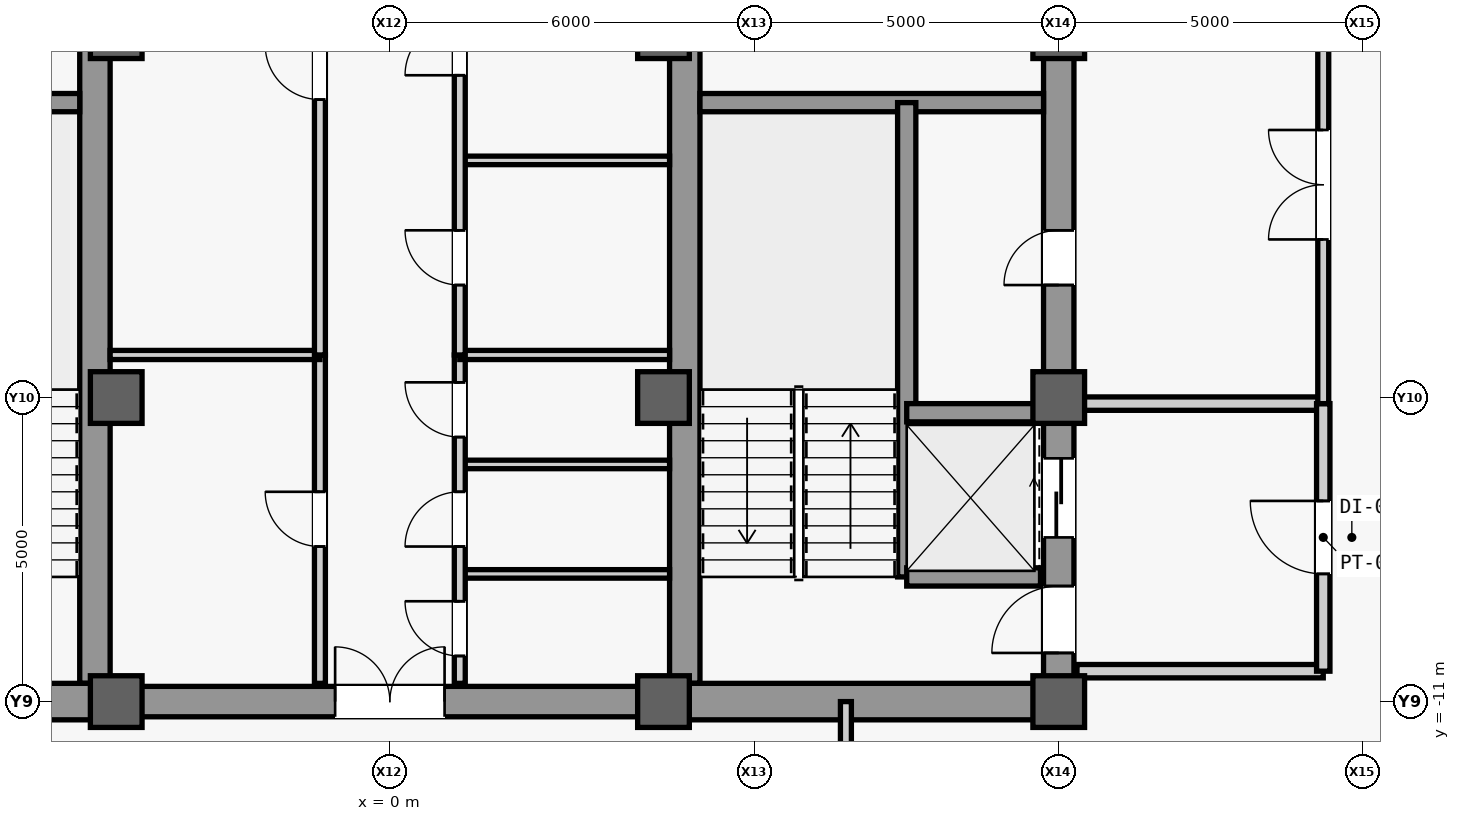
"""IFC4 building model, lengths in metres.
Left out: names, types, materials, properties, quantities, classifications, styles, units other than length and angle.
Written with IfcOpenShell. Run it as: python <this file> out.ifc"""

import sys

from ifc_helpers import new_model, si_unit, direction, frame, frame_2d, origin, origin_2d, place, context, subcontext, project, spatial, rectangle, extrude, source, transform, mapped, element, fill, save


model = new_model("IFC4")
c1 = context("Model", 3, precision=1e-05, world=origin(), true_north=direction((0.0, 1.0)))
c2 = subcontext(c1, "Body", "Model", "MODEL_VIEW")
j1 = project(units=[si_unit("LENGTHUNIT", "METRE"), si_unit("PLANEANGLEUNIT", "RADIAN")], contexts=[c1])
p1 = place(None, origin())
s1 = spatial("IfcSite", under=j1, at=p1, CompositionType="ELEMENT")
p2 = place(p1, origin())
s2 = spatial("IfcBuilding", under=s1, at=p2, CompositionType="ELEMENT")
p3 = place(p2, frame((0.0, 0.0, 223.1)))
s3 = spatial("IfcBuildingStorey", under=s2, at=p3, CompositionType="ELEMENT", Elevation=223.1)
m1 = source(origin(), c2, "Body", "SweptSolid", [
    extrude(rectangle(XDim=22.0, YDim=0.5, at=frame_2d((11.0, 0.0))), origin(), (0.0, 0.0, 1.0), 3.78),
])
p4 = place(p3, frame((11.0, -11.0, 0.0), z_axis=(0.0, 0.0, 1.0), x_axis=(0.0, 1.0, 0.0)))
e1 = element("IfcWall", 1, at=p4, inside=s3, PredefinedType="SHEAR", context=c2, shape_type="MappedRepresentation", body=[
    mapped(m1, transform((0.0, 0.0, 0.0), scale=1.0)),
])
m2 = source(origin(), c2, "Body", "SweptSolid", [
    extrude(rectangle(XDim=1.1, YDim=2.2, at=frame_2d((0.55, 1.1))), frame((0.0, 0.26, 0.0), z_axis=(0.0, -1.0, 0.0), x_axis=(1.0, 0.0, 0.0)), (0.0, 0.0, 1.0), 0.52),
])
p5 = place(p4, frame((0.8, 0.0, 0.0)))
e2 = element("IfcOpeningElement", 2, at=p5, cuts=e1, PredefinedType="OPENING", context=c2, shape_type="MappedRepresentation", body=[
    mapped(m2, transform((0.0, 0.0, 0.0), scale=1.0)),
])
m3 = source(origin(), c2, "Body", "SweptSolid", [
    extrude(rectangle(XDim=0.9, YDim=2.15, at=frame_2d((0.45, 1.075))), frame((0.0, 0.26, 0.0), z_axis=(0.0, -1.0, 0.0), x_axis=(1.0, 0.0, 0.0)), (0.0, 0.0, 1.0), 0.52),
])
p6 = place(p4, frame((6.85, 0.0, 0.0)))
e3 = element("IfcOpeningElement", 3, at=p6, cuts=e1, PredefinedType="OPENING", context=c2, shape_type="MappedRepresentation", body=[
    mapped(m3, transform((0.0, 0.0, 0.0), scale=1.0)),
])
m4 = source(origin(), c2, "Body", "SweptSolid", [
    extrude(rectangle(XDim=1.3, YDim=2.3, at=frame_2d((0.65, 1.15))), frame((0.0, 0.26, 0.0), z_axis=(0.0, -1.0, 0.0), x_axis=(1.0, 0.0, 0.0)), (0.0, 0.0, 1.0), 0.52),
])
p7 = place(p4, frame((2.7, 0.0, 0.0)))
e4 = element("IfcOpeningElement", 4, at=p7, cuts=e1, PredefinedType="OPENING", context=c2, shape_type="MappedRepresentation", body=[
    mapped(m4, transform((0.0, 0.0, 0.0), scale=1.0)),
])
p8 = place(p4, frame((13.35, 0.0, 0.0)))
e5 = element("IfcOpeningElement", 5, at=p8, cuts=e1, PredefinedType="OPENING", context=c2, shape_type="MappedRepresentation", body=[
    mapped(m4, transform((0.0, 0.0, 0.0), scale=1.0)),
])
m5 = source(origin(), c2, "Body", "SweptSolid", [
    extrude(rectangle(XDim=21.4, YDim=0.5, at=frame_2d((10.7, 0.0))), origin(), (0.0, 0.0, 1.0), 3.78),
])
for number, where, z_axis, x_axis in (
    (6, (-4.85, -10.7, 0.0), (0.0, 0.0, 1.0), (0.0, 1.0, 0.0)),
    (7, (4.85, -10.7, 0.0), (0.0, 0.0, 1.0), (0.0, 1.0, 0.0)),
):
    element("IfcWall", number, at=place(p3, frame(where, z_axis=z_axis, x_axis=x_axis)), inside=s3, PredefinedType="SHEAR", context=c2, shape_type="MappedRepresentation", body=[
        mapped(m5, transform((0.0, 0.0, 0.0), scale=1.0)),
    ])
m6 = source(origin(), c2, "Body", "SweptSolid", [
    extrude(rectangle(XDim=5.9, YDim=0.6, at=frame_2d((2.95, 0.0))), origin(), (0.0, 0.0, 1.0), 3.78),
])
for number, where, z_axis, x_axis in (
    (8, (-10.75, -11.0, 0.0), (0.0, 0.0, 1.0), (1.0, 0.0, 0.0)),
    (9, (4.85, -11.0, 0.0), (0.0, 0.0, 1.0), (1.0, 0.0, 0.0)),
):
    element("IfcWall", number, at=place(p3, frame(where, z_axis=z_axis, x_axis=x_axis)), inside=s3, PredefinedType="SHEAR", context=c2, shape_type="MappedRepresentation", body=[
        mapped(m6, transform((0.0, 0.0, 0.0), scale=1.0)),
    ])
m7 = source(origin(), c2, "Body", "SweptSolid", [
    extrude(rectangle(XDim=5.65, YDim=0.3, at=frame_2d((2.825, 0.0))), origin(), (0.0, 0.0, 1.0), 3.78),
])
for number, where, z_axis, x_axis in (
    (10, (-10.75, -1.15, 0.0), (0.0, 0.0, 1.0), (1.0, 0.0, 0.0)),
    (11, (5.1, -1.15, 0.0), (0.0, 0.0, 1.0), (1.0, 0.0, 0.0)),
):
    element("IfcWall", number, at=place(p3, frame(where, z_axis=z_axis, x_axis=x_axis)), inside=s3, PredefinedType="SHEAR", context=c2, shape_type="MappedRepresentation", body=[
        mapped(m7, transform((0.0, 0.0, 0.0), scale=1.0)),
    ])
m8 = source(origin(), c2, "Body", "SweptSolid", [
    extrude(rectangle(XDim=9.2, YDim=0.5, at=frame_2d((4.6, 0.0))), origin(), (0.0, 0.0, 1.0), 3.78),
])
p9 = place(p3, frame((-4.6, -11.0, 0.0), z_axis=(0.0, 0.0, 1.0), x_axis=(1.0, 0.0, 0.0)))
e12 = element("IfcWall", 12, at=p9, inside=s3, PredefinedType="SHEAR", context=c2, shape_type="MappedRepresentation", body=[
    mapped(m8, transform((0.0, 0.0, 0.0), scale=1.0)),
])
m9 = source(origin(), c2, "Body", "SweptSolid", [
    extrude(rectangle(XDim=1.8, YDim=2.25, at=frame_2d((0.9, 1.125))), frame((0.0, 0.26, 0.0), z_axis=(0.0, -1.0, 0.0), x_axis=(1.0, 0.0, 0.0)), (0.0, 0.0, 1.0), 0.52),
])
p10 = place(p9, frame((3.7, 0.0, 0.0)))
e13 = element("IfcOpeningElement", 13, at=p10, cuts=e12, PredefinedType="OPENING", context=c2, shape_type="MappedRepresentation", body=[
    mapped(m9, transform((0.0, 0.0, 0.0), scale=1.0)),
])
m10 = source(origin(), c2, "Body", "SweptSolid", [
    extrude(rectangle(XDim=0.85, YDim=0.85, at=origin_2d()), origin(), (0.0, 0.0, 1.0), 4.0),
])
for number, where, z_axis, x_axis in (
    (14, (-4.5, -11.0, 0.0), (0.0, 0.0, 1.0), (1.0, 0.0, 0.0)),
    (15, (-4.5, -6.0, 0.0), (0.0, 0.0, 1.0), (1.0, 0.0, 0.0)),
    (16, (-4.5, 0.0, 0.0), (0.0, 0.0, 1.0), (1.0, 0.0, 0.0)),
    (17, (4.5, -11.0, 0.0), (0.0, 0.0, 1.0), (1.0, 0.0, 0.0)),
    (18, (4.5, -6.0, 0.0), (0.0, 0.0, 1.0), (1.0, 0.0, 0.0)),
    (19, (4.5, 0.0, 0.0), (0.0, 0.0, 1.0), (1.0, 0.0, 0.0)),
    (20, (11.0, -11.0, 0.0), (0.0, 0.0, 1.0), (1.0, 0.0, 0.0)),
    (21, (11.0, -6.0, 0.0), (0.0, 0.0, 1.0), (1.0, 0.0, 0.0)),
    (22, (11.0, 0.0, 0.0), (0.0, 0.0, 1.0), (1.0, 0.0, 0.0)),
):
    element("IfcColumn", number, at=place(p3, frame(where, z_axis=z_axis, x_axis=x_axis)), inside=s3, PredefinedType="COLUMN", context=c2, shape_type="MappedRepresentation", body=[
        mapped(m10, transform((0.0, 0.0, 0.0), scale=1.0)),
    ])
m11 = source(origin(), c2, "Body", "SweptSolid", [
    extrude(rectangle(XDim=7.8, YDim=0.3, at=frame_2d((3.9, 0.0))), origin(), (0.0, 0.0, 1.0), 3.78),
])
p11 = place(p3, frame((8.5, -8.95, 0.0), z_axis=(0.0, 0.0, 1.0), x_axis=(0.0, 1.0, 0.0)))
e23 = element("IfcWall", 23, at=p11, inside=s3, PredefinedType="SHEAR", context=c2, shape_type="MappedRepresentation", body=[
    mapped(m11, transform((0.0, 0.0, 0.0), scale=1.0)),
])
m12 = source(origin(), c2, "Body", "SweptSolid", [
    extrude(rectangle(XDim=2.2, YDim=0.3, at=frame_2d((1.1, 0.0))), origin(), (0.0, 0.0, 1.0), 3.78),
])
for number, where, z_axis, x_axis in (
    (24, (8.5, -8.95, 0.0), (0.0, 0.0, 1.0), (1.0, 0.0, 0.0)),
    (25, (8.5, -6.25, 0.0), (0.0, 0.0, 1.0), (1.0, 0.0, 0.0)),
):
    element("IfcWall", number, at=place(p3, frame(where, z_axis=z_axis, x_axis=x_axis)), inside=s3, PredefinedType="SHEAR", context=c2, shape_type="MappedRepresentation", body=[
        mapped(m12, transform((0.0, 0.0, 0.0), scale=1.0)),
    ])
m13 = source(origin(), c2, "Body", "SweptSolid", [
    extrude(rectangle(XDim=4.05, YDim=0.22, at=frame_2d((2.025, 0.0))), origin(), (0.0, 0.0, 1.0), 3.78),
])
p12 = place(p3, frame((11.3, -10.5, 0.0), z_axis=(0.0, 0.0, 1.0), x_axis=(1.0, 0.0, 0.0)))
e26 = element("IfcWall", 26, at=p12, inside=s3, PredefinedType="PARTITIONING", context=c2, shape_type="MappedRepresentation", body=[
    mapped(m13, transform((0.0, 0.0, 0.0), scale=1.0)),
])
m14 = source(origin(), c2, "Body", "SweptSolid", [
    extrude(rectangle(XDim=4.05, YDim=0.22, at=frame_2d((2.025, 0.0))), origin(), (0.0, 0.0, 1.0), 3.085),
])
p13 = place(p3, frame((11.3, -6.1, 0.0), z_axis=(0.0, 0.0, 1.0), x_axis=(1.0, 0.0, 0.0)))
e27 = element("IfcWall", 27, at=p13, inside=s3, PredefinedType="PARTITIONING", context=c2, shape_type="MappedRepresentation", body=[
    mapped(m14, transform((0.0, 0.0, 0.0), scale=1.0)),
])
m15 = source(origin(), c2, "Body", "SweptSolid", [
    extrude(rectangle(XDim=4.4, YDim=0.22, at=frame_2d((2.2, 0.0))), origin(), (0.0, 0.0, 1.0), 3.78),
])
p14 = place(p3, frame((15.35, -10.5, 0.0), z_axis=(0.0, 0.0, 1.0), x_axis=(0.0, 1.0, 0.0)))
e28 = element("IfcWall", 28, at=p14, inside=s3, PredefinedType="PARTITIONING", context=c2, shape_type="MappedRepresentation", body=[
    mapped(m15, transform((0.0, 0.0, 0.0), scale=1.0)),
])
m16 = source(origin(), c2, "Body", "SweptSolid", [
    extrude(rectangle(XDim=1.2, YDim=2.2, at=frame_2d((0.6, 1.1))), frame((0.0, 0.12, 0.0), z_axis=(0.0, -1.0, 0.0), x_axis=(1.0, 0.0, 0.0)), (0.0, 0.0, 1.0), 0.24),
])
p15 = place(p14, frame((1.6, 0.0, 0.0)))
e29 = element("IfcOpeningElement", 29, at=p15, cuts=e28, PredefinedType="OPENING", context=c2, shape_type="MappedRepresentation", body=[
    mapped(m16, transform((0.0, 0.0, 0.0), scale=1.0)),
])
m17 = source(origin(), c2, "Body", "SweptSolid", [
    extrude(rectangle(XDim=16.6, YDim=0.18, at=frame_2d((8.3, 0.0))), origin(), (0.0, 0.0, 1.0), 3.78),
])
p16 = place(p3, frame((15.35, -6.1, 0.0), z_axis=(0.0, 0.0, 1.0), x_axis=(0.0, 1.0, 0.0)))
e30 = element("IfcWall", 30, at=p16, inside=s3, PredefinedType="PARTITIONING", context=c2, shape_type="MappedRepresentation", body=[
    mapped(m17, transform((0.0, 0.0, 0.0), scale=1.0)),
])
m18 = source(origin(), c2, "Body", "SweptSolid", [
    extrude(rectangle(XDim=1.8, YDim=2.25, at=frame_2d((0.9, 1.125))), frame((0.0, 0.1, 0.0), z_axis=(0.0, -1.0, 0.0), x_axis=(1.0, 0.0, 0.0)), (0.0, 0.0, 1.0), 0.2),
])
p17 = place(p16, frame((2.7, 0.0, 0.0)))
e31 = element("IfcOpeningElement", 31, at=p17, cuts=e30, PredefinedType="OPENING", context=c2, shape_type="MappedRepresentation", body=[
    mapped(m18, transform((0.0, 0.0, 0.0), scale=1.0)),
])
p18 = place(p16, frame((13.0, 0.0, 0.0)))
e32 = element("IfcOpeningElement", 32, at=p18, cuts=e30, PredefinedType="OPENING", context=c2, shape_type="MappedRepresentation", body=[
    mapped(m18, transform((0.0, 0.0, 0.0), scale=1.0)),
])
m19 = source(origin(), c2, "Body", "SweptSolid", [
    extrude(rectangle(XDim=5.4, YDim=0.18, at=frame_2d((2.7, 0.0))), origin(), (0.0, 0.0, 1.0), 3.78),
])
p19 = place(p3, frame((-1.15, -10.7, 0.0), z_axis=(0.0, 0.0, 1.0), x_axis=(0.0, 1.0, 0.0)))
e33 = element("IfcWall", 33, at=p19, inside=s3, PredefinedType="PARTITIONING", context=c2, shape_type="MappedRepresentation", body=[
    mapped(m19, transform((0.0, 0.0, 0.0), scale=1.0)),
])
m20 = source(origin(), c2, "Body", "SweptSolid", [
    extrude(rectangle(XDim=0.9, YDim=2.15, at=frame_2d((0.45, 1.075))), frame((0.0, 0.1, 0.0), z_axis=(0.0, -1.0, 0.0), x_axis=(1.0, 0.0, 0.0)), (0.0, 0.0, 1.0), 0.2),
])
p20 = place(p19, frame((2.25, 0.0, 0.0)))
e34 = element("IfcOpeningElement", 34, at=p20, cuts=e33, PredefinedType="OPENING", context=c2, shape_type="MappedRepresentation", body=[
    mapped(m20, transform((0.0, 0.0, 0.0), scale=1.0)),
])
m21 = source(origin(), c2, "Body", "SweptSolid", [
    extrude(rectangle(XDim=3.45, YDim=0.14, at=frame_2d((1.725, 0.0))), origin(), (0.0, 0.0, 1.0), 3.78),
])
for number, where, z_axis, x_axis in (
    (35, (1.15, -8.9, 0.0), (0.0, 0.0, 1.0), (1.0, 0.0, 0.0)),
    (36, (1.15, -7.1, 0.0), (0.0, 0.0, 1.0), (1.0, 0.0, 0.0)),
):
    element("IfcWall", number, at=place(p3, frame(where, z_axis=z_axis, x_axis=x_axis)), inside=s3, PredefinedType="PARTITIONING", context=c2, shape_type="MappedRepresentation", body=[
        mapped(m21, transform((0.0, 0.0, 0.0), scale=1.0)),
    ])
p21 = place(p3, frame((1.15, -10.7, 0.0), z_axis=(0.0, 0.0, 1.0), x_axis=(0.0, 1.0, 0.0)))
e37 = element("IfcWall", 37, at=p21, inside=s3, PredefinedType="PARTITIONING", context=c2, shape_type="MappedRepresentation", body=[
    mapped(m19, transform((0.0, 0.0, 0.0), scale=1.0)),
])
p22 = place(p21, frame((0.45, 0.0, 0.0)))
e38 = element("IfcOpeningElement", 38, at=p22, cuts=e37, PredefinedType="OPENING", context=c2, shape_type="MappedRepresentation", body=[
    mapped(m20, transform((0.0, 0.0, 0.0), scale=1.0)),
])
p23 = place(p21, frame((2.25, 0.0, 0.0)))
e39 = element("IfcOpeningElement", 39, at=p23, cuts=e37, PredefinedType="OPENING", context=c2, shape_type="MappedRepresentation", body=[
    mapped(m20, transform((0.0, 0.0, 0.0), scale=1.0)),
])
p24 = place(p21, frame((4.05, 0.0, 0.0)))
e40 = element("IfcOpeningElement", 40, at=p24, cuts=e37, PredefinedType="OPENING", context=c2, shape_type="MappedRepresentation", body=[
    mapped(m20, transform((0.0, 0.0, 0.0), scale=1.0)),
])
m22 = source(origin(), c2, "Body", "SweptSolid", [
    extrude(rectangle(XDim=3.45, YDim=0.15, at=frame_2d((1.725, 0.0))), origin(), (0.0, 0.0, 1.0), 3.78),
])
for number, where, z_axis, x_axis in (
    (41, (-4.6, -5.3, 0.0), (0.0, 0.0, 1.0), (1.0, 0.0, 0.0)),
    (42, (1.15, -5.3, 0.0), (0.0, 0.0, 1.0), (1.0, 0.0, 0.0)),
):
    element("IfcWall", number, at=place(p3, frame(where, z_axis=z_axis, x_axis=x_axis)), inside=s3, PredefinedType="PARTITIONING", context=c2, shape_type="MappedRepresentation", body=[
        mapped(m22, transform((0.0, 0.0, 0.0), scale=1.0)),
    ])
m23 = source(origin(), c2, "Body", "SweptSolid", [
    extrude(rectangle(XDim=10.6, YDim=0.18, at=frame_2d((5.3, 0.0))), origin(), (0.0, 0.0, 1.0), 3.78),
])
p25 = place(p3, frame((-1.15, -5.3, 0.0), z_axis=(0.0, 0.0, 1.0), x_axis=(0.0, 1.0, 0.0)))
e43 = element("IfcWall", 43, at=p25, inside=s3, PredefinedType="PARTITIONING", context=c2, shape_type="MappedRepresentation", body=[
    mapped(m23, transform((0.0, 0.0, 0.0), scale=1.0)),
])
p26 = place(p25, frame((4.2, 0.0, 0.0)))
e44 = element("IfcOpeningElement", 44, at=p26, cuts=e43, PredefinedType="OPENING", context=c2, shape_type="MappedRepresentation", body=[
    mapped(m20, transform((0.0, 0.0, 0.0), scale=1.0)),
])
p27 = place(p25, frame((9.475, 0.0, 0.0)))
e45 = element("IfcOpeningElement", 45, at=p27, cuts=e43, PredefinedType="OPENING", context=c2, shape_type="MappedRepresentation", body=[
    mapped(m20, transform((0.0, 0.0, 0.0), scale=1.0)),
])
p28 = place(p3, frame((1.15, -2.1, 0.0), z_axis=(0.0, 0.0, 1.0), x_axis=(1.0, 0.0, 0.0)))
e46 = element("IfcWall", 46, at=p28, inside=s3, PredefinedType="PARTITIONING", context=c2, shape_type="MappedRepresentation", body=[
    mapped(m21, transform((0.0, 0.0, 0.0), scale=1.0)),
])
p29 = place(p3, frame((1.15, -5.3, 0.0), z_axis=(0.0, 0.0, 1.0), x_axis=(0.0, 1.0, 0.0)))
e47 = element("IfcWall", 47, at=p29, inside=s3, PredefinedType="PARTITIONING", context=c2, shape_type="MappedRepresentation", body=[
    mapped(m23, transform((0.0, 0.0, 0.0), scale=1.0)),
])
p30 = place(p29, frame((1.15, 0.0, 0.0)))
e48 = element("IfcOpeningElement", 48, at=p30, cuts=e47, PredefinedType="OPENING", context=c2, shape_type="MappedRepresentation", body=[
    mapped(m20, transform((0.0, 0.0, 0.0), scale=1.0)),
])
p31 = place(p29, frame((4.6, 0.0, 0.0)))
e49 = element("IfcOpeningElement", 49, at=p31, cuts=e47, PredefinedType="OPENING", context=c2, shape_type="MappedRepresentation", body=[
    mapped(m20, transform((0.0, 0.0, 0.0), scale=1.0)),
])
p32 = place(p29, frame((7.65, 0.0, 0.0)))
e50 = element("IfcOpeningElement", 50, at=p32, cuts=e47, PredefinedType="OPENING", context=c2, shape_type="MappedRepresentation", body=[
    mapped(m20, transform((0.0, 0.0, 0.0), scale=1.0)),
])
p33 = place(p29, frame((9.475, 0.0, 0.0)))
e51 = element("IfcOpeningElement", 51, at=p33, cuts=e47, PredefinedType="OPENING", context=c2, shape_type="MappedRepresentation", body=[
    mapped(m20, transform((0.0, 0.0, 0.0), scale=1.0)),
])
m24 = source(origin(), c2, "Body", "SweptSolid", [
    extrude(rectangle(XDim=2.6, YDim=0.18, at=frame_2d((1.3, 0.0))), origin(), (0.0, 0.0, 1.0), 3.78),
])
p34 = place(p3, frame((7.5, -13.6, 0.0), z_axis=(0.0, 0.0, 1.0), x_axis=(0.0, 1.0, 0.0)))
e52 = element("IfcWall", 52, at=p34, inside=s3, PredefinedType="PARTITIONING", context=c2, shape_type="MappedRepresentation", body=[
    mapped(m24, transform((0.0, 0.0, 0.0), scale=1.0)),
])
m25 = source(origin(), c2, "Body", "SweptSolid", [
    extrude(rectangle(XDim=1.1, YDim=2.2, at=frame_2d((0.55, 1.1))), frame((0.0, 0.025, 0.0), z_axis=(0.0, -1.0, 0.0), x_axis=(1.0, 0.0, 0.0)), (0.0, 0.0, 1.0), 0.05),
])
p35 = place(p5, origin())
e53 = element("IfcDoor", 53, at=p35, inside=s3, OperationType="SINGLE_SWING_LEFT", PredefinedType="DOOR", context=c2, shape_type="MappedRepresentation", body=[
    mapped(m25, transform((0.0, 0.0, 0.0), scale=1.0)),
])
fill(e2, e53)
m26 = source(origin(), c2, "Body", "SweptSolid", [
    extrude(rectangle(XDim=0.9, YDim=2.15, at=frame_2d((0.45, 1.075))), frame((0.0, 0.025, 0.0), z_axis=(0.0, -1.0, 0.0), x_axis=(1.0, 0.0, 0.0)), (0.0, 0.0, 1.0), 0.05),
])
p36 = place(p6, origin())
e54 = element("IfcDoor", 54, at=p36, inside=s3, OperationType="SINGLE_SWING_LEFT", PredefinedType="DOOR", context=c2, shape_type="MappedRepresentation", body=[
    mapped(m26, transform((0.0, 0.0, 0.0), scale=1.0)),
])
fill(e3, e54)
m27 = source(origin(), c2, "Body", "SweptSolid", [
    extrude(rectangle(XDim=1.2, YDim=2.2, at=frame_2d((0.6, 1.1))), frame((0.0, 0.025, 0.0), z_axis=(0.0, -1.0, 0.0), x_axis=(1.0, 0.0, 0.0)), (0.0, 0.0, 1.0), 0.05),
])
p37 = place(p15, origin())
e55 = element("IfcDoor", 55, at=p37, inside=s3, OperationType="SINGLE_SWING_RIGHT", PredefinedType="DOOR", context=c2, shape_type="MappedRepresentation", body=[
    mapped(m27, transform((0.0, 0.0, 0.0), scale=1.0)),
])
fill(e29, e55)
m28 = source(origin(), c2, "Body", "SweptSolid", [
    extrude(rectangle(XDim=1.8, YDim=2.25, at=frame_2d((0.9, 1.125))), frame((0.0, 0.025, 0.0), z_axis=(0.0, -1.0, 0.0), x_axis=(1.0, 0.0, 0.0)), (0.0, 0.0, 1.0), 0.05),
])
p38 = place(p17, origin())
e56 = element("IfcDoor", 56, at=p38, inside=s3, OperationType="SINGLE_SWING_RIGHT", PredefinedType="DOOR", context=c2, shape_type="MappedRepresentation", body=[
    mapped(m28, transform((0.0, 0.0, 0.0), scale=1.0)),
])
fill(e31, e56)
p39 = place(p20, origin())
e57 = element("IfcDoor", 57, at=p39, inside=s3, OperationType="SINGLE_SWING_RIGHT", PredefinedType="DOOR", context=c2, shape_type="MappedRepresentation", body=[
    mapped(m26, transform((0.0, 0.0, 0.0), scale=1.0)),
])
fill(e34, e57)
p40 = place(p22, origin())
e58 = element("IfcDoor", 58, at=p40, inside=s3, OperationType="SINGLE_SWING_RIGHT", PredefinedType="DOOR", context=c2, shape_type="MappedRepresentation", body=[
    mapped(m26, transform((0.0, 0.0, 0.0), scale=1.0)),
])
fill(e38, e58)
p41 = place(p23, origin())
e59 = element("IfcDoor", 59, at=p41, inside=s3, OperationType="SINGLE_SWING_LEFT", PredefinedType="DOOR", context=c2, shape_type="MappedRepresentation", body=[
    mapped(m26, transform((0.0, 0.0, 0.0), scale=1.0)),
])
fill(e39, e59)
p42 = place(p24, origin())
e60 = element("IfcDoor", 60, at=p42, inside=s3, OperationType="SINGLE_SWING_RIGHT", PredefinedType="DOOR", context=c2, shape_type="MappedRepresentation", body=[
    mapped(m26, transform((0.0, 0.0, 0.0), scale=1.0)),
])
fill(e40, e60)
p43 = place(p10, origin())
e61 = element("IfcDoor", 61, at=p43, inside=s3, OperationType="SINGLE_SWING_LEFT", PredefinedType="DOOR", context=c2, shape_type="MappedRepresentation", body=[
    mapped(m28, transform((0.0, 0.0, 0.0), scale=1.0)),
])
fill(e13, e61)
p44 = place(p26, origin())
e62 = element("IfcDoor", 62, at=p44, inside=s3, OperationType="SINGLE_SWING_RIGHT", PredefinedType="DOOR", context=c2, shape_type="MappedRepresentation", body=[
    mapped(m26, transform((0.0, 0.0, 0.0), scale=1.0)),
])
fill(e44, e62)
p45 = place(p30, origin())
e63 = element("IfcDoor", 63, at=p45, inside=s3, OperationType="SINGLE_SWING_RIGHT", PredefinedType="DOOR", context=c2, shape_type="MappedRepresentation", body=[
    mapped(m26, transform((0.0, 0.0, 0.0), scale=1.0)),
])
fill(e48, e63)
p46 = place(p31, origin())
e64 = element("IfcDoor", 64, at=p46, inside=s3, OperationType="SINGLE_SWING_LEFT", PredefinedType="DOOR", context=c2, shape_type="MappedRepresentation", body=[
    mapped(m26, transform((0.0, 0.0, 0.0), scale=1.0)),
])
fill(e49, e64)
m29 = source(origin(), c2, "Body", "SweptSolid", [
    extrude(rectangle(XDim=1.3, YDim=2.3, at=frame_2d((0.65, 1.15))), frame((0.0, 0.025, 0.0), z_axis=(0.0, -1.0, 0.0), x_axis=(1.0, 0.0, 0.0)), (0.0, 0.0, 1.0), 0.05),
])
p47 = place(p7, origin())
e65 = element("IfcDoor", 65, at=p47, inside=s3, OperationType="SLIDING_TO_LEFT", PredefinedType="DOOR", context=c2, shape_type="MappedRepresentation", body=[
    mapped(m29, transform((0.0, 0.0, 0.0), scale=1.0)),
])
fill(e4, e65)
save(model, sys.argv[1])
